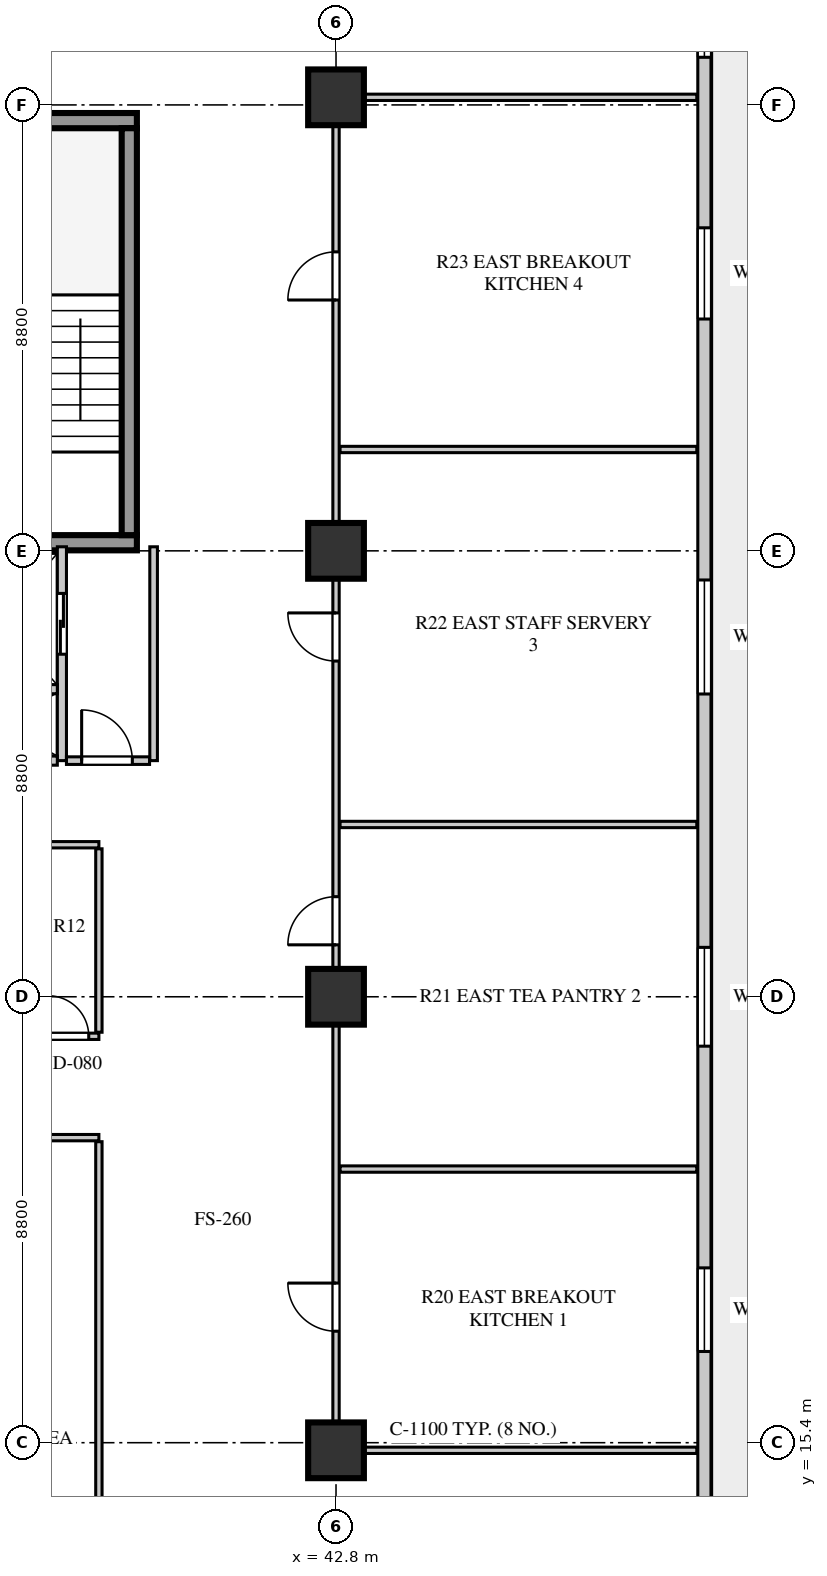
"""IFC4 building model, lengths in metres.
Left out: names, types, materials, properties, quantities, classifications, styles, units other than length and angle.
Written with IfcOpenShell. Run it as: python <this file> out.ifc"""

import sys

from ifc_helpers import new_model, si_unit, direction, frame, frame_2d, origin, origin_2d, place, context, subcontext, project, spatial, rectangle, extrude, element, fill, save


model = new_model("IFC4")
c1 = context("Model", 3, precision=1e-05, world=origin(), true_north=direction((0.0, 1.0)))
c2 = subcontext(c1, "Body", "Model", "MODEL_VIEW")
j1 = project(units=[si_unit("LENGTHUNIT", "METRE"), si_unit("PLANEANGLEUNIT", "RADIAN")], contexts=[c1])
p1 = place(None, origin())
s1 = spatial("IfcSite", under=j1, at=p1, CompositionType="ELEMENT")
p2 = place(p1, origin())
s2 = spatial("IfcBuilding", under=s1, at=p2, CompositionType="ELEMENT")
p3 = place(p2, frame((0.0, 0.0, 90.0)))
s3 = spatial("IfcBuildingStorey", under=s2, at=p3, CompositionType="ELEMENT", Elevation=90.0)
for number, where, z_axis, x_axis in (
    (1, (34.35, 33.16, 0.0), (0.0, 0.0, 1.0), (1.0, 0.0, 0.0)),
    (2, (34.35, 41.49, 0.0), (0.0, 0.0, 1.0), (1.0, 0.0, 0.0)),
):
    element("IfcWall", number, at=place(p3, frame(where, z_axis=z_axis, x_axis=x_axis)), inside=s3, PredefinedType="SHEAR", context=c2, shape_type="SweptSolid", body=[
        extrude(rectangle(XDim=4.52, YDim=0.3, at=frame_2d((2.26, 0.0))), origin(), (0.0, 0.0, 1.0), 3.7),
    ])
p4 = place(p3, frame((38.72, 33.31, 0.0), z_axis=(0.0, 0.0, 1.0), x_axis=(0.0, 1.0, 0.0)))
e3 = element("IfcWall", 3, at=p4, inside=s3, PredefinedType="SHEAR", context=c2, shape_type="SweptSolid", body=[
    extrude(rectangle(XDim=8.03, YDim=0.3, at=frame_2d((4.015, 0.0))), origin(), (0.0, 0.0, 1.0), 3.7),
])
for number, where, z_axis, x_axis in (
    (4, (42.8, 15.25, 0.0), (0.0, 0.0, 1.0), (1.0, 0.0, 0.0)),
    (5, (42.8, 24.2, 0.0), (0.0, 0.0, 1.0), (1.0, 0.0, 0.0)),
    (6, (42.8, 33.0, 0.0), (0.0, 0.0, 1.0), (1.0, 0.0, 0.0)),
    (7, (42.8, 41.95, 0.0), (0.0, 0.0, 1.0), (1.0, 0.0, 0.0)),
):
    element("IfcColumn", number, at=place(p3, frame(where, z_axis=z_axis, x_axis=x_axis)), inside=s3, PredefinedType="COLUMN", context=c2, shape_type="SweptSolid", body=[
        extrude(rectangle(XDim=1.1, YDim=1.1, at=origin_2d()), origin(), (0.0, 0.0, 1.0), 3.7),
    ])
p5 = place(p3, frame((50.07, 12.06, 0.0), z_axis=(0.0, 0.0, 1.0), x_axis=(0.0, 1.0, 0.0)))
e8 = element("IfcWall", 8, at=p5, inside=s3, PredefinedType="SOLIDWALL", context=c2, shape_type="SweptSolid", body=[
    extrude(rectangle(XDim=33.08, YDim=0.26, at=frame_2d((16.54, 0.0))), origin(), (0.0, 0.0, 1.0), 3.7),
])
p6 = place(p5, frame((0.69, 0.0, 0.0)))
e9 = element("IfcOpeningElement", 9, at=p6, cuts=e8, PredefinedType="OPENING", context=c2, shape_type="SweptSolid", body=[
    extrude(rectangle(XDim=1.0, YDim=2.05, at=frame_2d((0.5, 1.025))), frame((0.0, 0.14, 0.0), z_axis=(0.0, -1.0, 0.0), x_axis=(1.0, 0.0, 0.0)), (0.0, 0.0, 1.0), 0.28),
])
p7 = place(p5, frame((5.14, 0.0, 0.8)))
e10 = element("IfcOpeningElement", 10, at=p7, cuts=e8, PredefinedType="OPENING", context=c2, shape_type="SweptSolid", body=[
    extrude(rectangle(XDim=1.65, YDim=1.95, at=frame_2d((0.825, 0.975))), frame((0.0, 0.14, 0.0), z_axis=(0.0, -1.0, 0.0), x_axis=(1.0, 0.0, 0.0)), (0.0, 0.0, 1.0), 0.28),
])
p8 = place(p5, frame((11.165, 0.0, 0.8)))
e11 = element("IfcOpeningElement", 11, at=p8, cuts=e8, PredefinedType="OPENING", context=c2, shape_type="SweptSolid", body=[
    extrude(rectangle(XDim=1.95, YDim=2.0, at=frame_2d((0.975, 1.0))), frame((0.0, 0.14, 0.0), z_axis=(0.0, -1.0, 0.0), x_axis=(1.0, 0.0, 0.0)), (0.0, 0.0, 1.0), 0.28),
])
p9 = place(p5, frame((18.115, 0.0, 0.8)))
e12 = element("IfcOpeningElement", 12, at=p9, cuts=e8, PredefinedType="OPENING", context=c2, shape_type="SweptSolid", body=[
    extrude(rectangle(XDim=2.25, YDim=2.0, at=frame_2d((1.125, 1.0))), frame((0.0, 0.14, 0.0), z_axis=(0.0, -1.0, 0.0), x_axis=(1.0, 0.0, 0.0)), (0.0, 0.0, 1.0), 0.28),
])
p10 = place(p5, frame((25.515, 0.0, 0.8)))
e13 = element("IfcOpeningElement", 13, at=p10, cuts=e8, PredefinedType="OPENING", context=c2, shape_type="SweptSolid", body=[
    extrude(rectangle(XDim=1.8, YDim=2.0, at=frame_2d((0.9, 1.0))), frame((0.0, 0.14, 0.0), z_axis=(0.0, -1.0, 0.0), x_axis=(1.0, 0.0, 0.0)), (0.0, 0.0, 1.0), 0.28),
])
p11 = place(p5, frame((30.68, 0.0, 0.8)))
e14 = element("IfcOpeningElement", 14, at=p11, cuts=e8, PredefinedType="OPENING", context=c2, shape_type="SweptSolid", body=[
    extrude(rectangle(XDim=1.5, YDim=2.0, at=frame_2d((0.75, 1.0))), frame((0.0, 0.14, 0.0), z_axis=(0.0, -1.0, 0.0), x_axis=(1.0, 0.0, 0.0)), (0.0, 0.0, 1.0), 0.28),
])
p12 = place(p3, frame((37.39, 28.86, 0.0), z_axis=(0.0, 0.0, 1.0), x_axis=(0.0, 1.0, 0.0)))
e15 = element("IfcWall", 15, at=p12, inside=s3, PredefinedType="SOLIDWALL", context=c2, shape_type="SweptSolid", body=[
    extrude(rectangle(XDim=4.22, YDim=0.18, at=frame_2d((2.11, 0.0))), origin(), (0.0, 0.0, 1.0), 3.7),
])
p13 = place(p12, frame((2.1, 0.0, 0.0)))
e16 = element("IfcOpeningElement", 16, at=p13, cuts=e15, PredefinedType="OPENING", context=c2, shape_type="SweptSolid", body=[
    extrude(rectangle(XDim=1.2, YDim=2.12, at=frame_2d((0.6, 1.06))), frame((0.0, 0.1, 0.0), z_axis=(0.0, -1.0, 0.0), x_axis=(1.0, 0.0, 0.0)), (0.0, 0.0, 1.0), 0.2),
])
for number, where, z_axis, x_axis in (
    (17, (35.05, 28.86, 0.0), (0.0, 0.0, 1.0), (1.0, 0.0, 0.0)),
    (18, (35.05, 30.27, 0.0), (0.0, 0.0, 1.0), (1.0, 0.0, 0.0)),
):
    element("IfcWall", number, at=place(p3, frame(where, z_axis=z_axis, x_axis=x_axis)), inside=s3, PredefinedType="SOLIDWALL", context=c2, shape_type="SweptSolid", body=[
        extrude(rectangle(XDim=2.25, YDim=0.18, at=frame_2d((1.125, 0.0))), origin(), (0.0, 0.0, 1.0), 3.7),
    ])
p14 = place(p3, frame((39.2, 28.86, 0.0), z_axis=(0.0, 0.0, 1.0), x_axis=(0.0, 1.0, 0.0)))
e19 = element("IfcWall", 19, at=p14, inside=s3, PredefinedType="PARTITIONING", context=c2, shape_type="SweptSolid", body=[
    extrude(rectangle(XDim=4.22, YDim=0.15, at=frame_2d((2.11, 0.0))), origin(), (0.0, 0.0, 1.0), 3.7),
])
p15 = place(p3, frame((37.48, 28.86, 0.0), z_axis=(0.0, 0.0, 1.0), x_axis=(1.0, 0.0, 0.0)))
e20 = element("IfcWall", 20, at=p15, inside=s3, PredefinedType="PARTITIONING", context=c2, shape_type="SweptSolid", body=[
    extrude(rectangle(XDim=1.64, YDim=0.15, at=frame_2d((0.82, 0.0))), origin(), (0.0, 0.0, 1.0), 3.7),
])
p16 = place(p15, frame((0.3, 0.0, 0.0)))
e21 = element("IfcOpeningElement", 21, at=p16, cuts=e20, PredefinedType="OPENING", context=c2, shape_type="SweptSolid", body=[
    extrude(rectangle(XDim=1.0, YDim=2.1, at=frame_2d((0.5, 1.05))), frame((0.0, 0.085, 0.0), z_axis=(0.0, -1.0, 0.0), x_axis=(1.0, 0.0, 0.0)), (0.0, 0.0, 1.0), 0.17),
])
p17 = place(p3, frame((25.25, 21.42, 0.0), z_axis=(0.0, 0.0, 1.0), x_axis=(1.0, 0.0, 0.0)))
e22 = element("IfcWall", 22, at=p17, inside=s3, PredefinedType="PLUMBINGWALL", context=c2, shape_type="SweptSolid", body=[
    extrude(rectangle(XDim=12.87, YDim=0.125, at=frame_2d((6.435, 0.0))), origin(), (0.0, 0.0, 1.0), 3.3),
])
p18 = place(p17, frame((1.725, 0.0, 0.0)))
e23 = element("IfcOpeningElement", 23, at=p18, cuts=e22, PredefinedType="OPENING", context=c2, shape_type="SweptSolid", body=[
    extrude(rectangle(XDim=0.95, YDim=2.08, at=frame_2d((0.475, 1.04))), frame((0.0, 0.073, 0.0), z_axis=(0.0, -1.0, 0.0), x_axis=(1.0, 0.0, 0.0)), (0.0, 0.0, 1.0), 0.145),
])
p19 = place(p17, frame((6.175, 0.0, 0.0)))
e24 = element("IfcOpeningElement", 24, at=p19, cuts=e22, PredefinedType="OPENING", context=c2, shape_type="SweptSolid", body=[
    extrude(rectangle(XDim=0.95, YDim=2.08, at=frame_2d((0.475, 1.04))), frame((0.0, 0.073, 0.0), z_axis=(0.0, -1.0, 0.0), x_axis=(1.0, 0.0, 0.0)), (0.0, 0.0, 1.0), 0.145),
])
p20 = place(p17, frame((10.395, 0.0, 0.0)))
e25 = element("IfcOpeningElement", 25, at=p20, cuts=e22, PredefinedType="OPENING", context=c2, shape_type="SweptSolid", body=[
    extrude(rectangle(XDim=0.95, YDim=2.08, at=frame_2d((0.475, 1.04))), frame((0.0, 0.073, 0.0), z_axis=(0.0, -1.0, 0.0), x_axis=(1.0, 0.0, 0.0)), (0.0, 0.0, 1.0), 0.145),
])
p21 = place(p3, frame((38.12, 8.48, 0.0), z_axis=(0.0, 0.0, 1.0), x_axis=(0.0, 1.0, 0.0)))
e26 = element("IfcWall", 26, at=p21, inside=s3, PredefinedType="PLUMBINGWALL", context=c2, shape_type="SweptSolid", body=[
    extrude(rectangle(XDim=12.86, YDim=0.125, at=frame_2d((6.43, 0.0))), origin(), (0.0, 0.0, 1.0), 3.7),
])
p22 = place(p3, frame((34.6, 23.42, 0.0), z_axis=(0.0, 0.0, 1.0), x_axis=(1.0, 0.0, 0.0)))
e27 = element("IfcWall", 27, at=p22, inside=s3, PredefinedType="PLUMBINGWALL", context=c2, shape_type="SweptSolid", body=[
    extrude(rectangle(XDim=3.52, YDim=0.125, at=frame_2d((1.76, 0.0))), origin(), (0.0, 0.0, 1.0), 3.7),
])
p23 = place(p22, frame((0.22, 0.0, 0.0)))
e28 = element("IfcOpeningElement", 28, at=p23, cuts=e27, PredefinedType="OPENING", context=c2, shape_type="SweptSolid", body=[
    extrude(rectangle(XDim=0.8, YDim=2.05, at=frame_2d((0.4, 1.025))), frame((0.0, 0.073, 0.0), z_axis=(0.0, -1.0, 0.0), x_axis=(1.0, 0.0, 0.0)), (0.0, 0.0, 1.0), 0.145),
])
p24 = place(p22, frame((1.38, 0.0, 0.0)))
e29 = element("IfcOpeningElement", 29, at=p24, cuts=e27, PredefinedType="OPENING", context=c2, shape_type="SweptSolid", body=[
    extrude(rectangle(XDim=0.8, YDim=2.05, at=frame_2d((0.4, 1.025))), frame((0.0, 0.073, 0.0), z_axis=(0.0, -1.0, 0.0), x_axis=(1.0, 0.0, 0.0)), (0.0, 0.0, 1.0), 0.145),
])
p25 = place(p22, frame((2.52, 0.0, 0.0)))
e30 = element("IfcOpeningElement", 30, at=p25, cuts=e27, PredefinedType="OPENING", context=c2, shape_type="SweptSolid", body=[
    extrude(rectangle(XDim=0.8, YDim=2.05, at=frame_2d((0.4, 1.025))), frame((0.0, 0.073, 0.0), z_axis=(0.0, -1.0, 0.0), x_axis=(1.0, 0.0, 0.0)), (0.0, 0.0, 1.0), 0.145),
])
p26 = place(p3, frame((42.8, 15.25, 0.0), z_axis=(0.0, 0.0, 1.0), x_axis=(0.0, 1.0, 0.0)))
e31 = element("IfcWall", 31, at=p26, inside=s3, PredefinedType="PLUMBINGWALL", context=c2, shape_type="SweptSolid", body=[
    extrude(rectangle(XDim=26.7, YDim=0.125, at=frame_2d((13.35, 0.0))), origin(), (0.0, 0.0, 1.0), 3.0),
])
p27 = place(p26, frame((2.35, 0.0, 0.0)))
e32 = element("IfcOpeningElement", 32, at=p27, cuts=e31, PredefinedType="OPENING", context=c2, shape_type="SweptSolid", body=[
    extrude(rectangle(XDim=0.95, YDim=2.08, at=frame_2d((0.475, 1.04))), frame((0.0, 0.073, 0.0), z_axis=(0.0, -1.0, 0.0), x_axis=(1.0, 0.0, 0.0)), (0.0, 0.0, 1.0), 0.145),
])
p28 = place(p26, frame((9.975, 0.0, 0.0)))
e33 = element("IfcOpeningElement", 33, at=p28, cuts=e31, PredefinedType="OPENING", context=c2, shape_type="SweptSolid", body=[
    extrude(rectangle(XDim=0.95, YDim=2.08, at=frame_2d((0.475, 1.04))), frame((0.0, 0.073, 0.0), z_axis=(0.0, -1.0, 0.0), x_axis=(1.0, 0.0, 0.0)), (0.0, 0.0, 1.0), 0.145),
])
p29 = place(p26, frame((15.575, 0.0, 0.0)))
e34 = element("IfcOpeningElement", 34, at=p29, cuts=e31, PredefinedType="OPENING", context=c2, shape_type="SweptSolid", body=[
    extrude(rectangle(XDim=0.95, YDim=2.08, at=frame_2d((0.475, 1.04))), frame((0.0, 0.073, 0.0), z_axis=(0.0, -1.0, 0.0), x_axis=(1.0, 0.0, 0.0)), (0.0, 0.0, 1.0), 0.145),
])
p30 = place(p26, frame((22.7, 0.0, 0.0)))
e35 = element("IfcOpeningElement", 35, at=p30, cuts=e31, PredefinedType="OPENING", context=c2, shape_type="SweptSolid", body=[
    extrude(rectangle(XDim=0.95, YDim=2.08, at=frame_2d((0.475, 1.04))), frame((0.0, 0.073, 0.0), z_axis=(0.0, -1.0, 0.0), x_axis=(1.0, 0.0, 0.0)), (0.0, 0.0, 1.0), 0.145),
])
for number, where, z_axis, x_axis in (
    (36, (42.88, 15.25, 0.0), (0.0, 0.0, 1.0), (1.0, 0.0, 0.0)),
    (37, (42.88, 41.95, 0.0), (0.0, 0.0, 1.0), (1.0, 0.0, 0.0)),
):
    element("IfcWall", number, at=place(p3, frame(where, z_axis=z_axis, x_axis=x_axis)), inside=s3, PredefinedType="PLUMBINGWALL", context=c2, shape_type="SweptSolid", body=[
        extrude(rectangle(XDim=7.04, YDim=0.125, at=frame_2d((3.52, 0.0))), origin(), (0.0, 0.0, 1.0), 3.2),
    ])
p31 = place(p3, frame((34.6, 27.2, 0.0), z_axis=(0.0, 0.0, 1.0), x_axis=(1.0, 0.0, 0.0)))
e38 = element("IfcWall", 38, at=p31, inside=s3, PredefinedType="PLUMBINGWALL", context=c2, shape_type="SweptSolid", body=[
    extrude(rectangle(XDim=3.52, YDim=0.125, at=frame_2d((1.76, 0.0))), origin(), (0.0, 0.0, 1.0), 3.3),
])
p32 = place(p3, frame((38.12, 23.5, 0.0), z_axis=(0.0, 0.0, 1.0), x_axis=(0.0, 1.0, 0.0)))
e39 = element("IfcWall", 39, at=p32, inside=s3, PredefinedType="PLUMBINGWALL", context=c2, shape_type="SweptSolid", body=[
    extrude(rectangle(XDim=3.62, YDim=0.125, at=frame_2d((1.81, 0.0))), origin(), (0.0, 0.0, 1.0), 3.7),
])
for number, where, z_axis, x_axis in (
    (40, (42.88, 20.8, 0.0), (0.0, 0.0, 1.0), (1.0, 0.0, 0.0)),
    (41, (42.88, 27.6, 0.0), (0.0, 0.0, 1.0), (1.0, 0.0, 0.0)),
    (42, (42.88, 35.0, 0.0), (0.0, 0.0, 1.0), (1.0, 0.0, 0.0)),
):
    element("IfcWall", number, at=place(p3, frame(where, z_axis=z_axis, x_axis=x_axis)), inside=s3, PredefinedType="PLUMBINGWALL", context=c2, shape_type="SweptSolid", body=[
        extrude(rectangle(XDim=7.04, YDim=0.125, at=frame_2d((3.52, 0.0))), origin(), (0.0, 0.0, 1.0), 3.7),
    ])
p33 = place(p7, origin())
e43 = element("IfcWindow", 43, at=p33, inside=s3, PartitioningType="SINGLE_PANEL", PredefinedType="WINDOW", context=c2, shape_type="SweptSolid", body=[
    extrude(rectangle(XDim=1.65, YDim=1.95, at=frame_2d((0.825, 0.975))), frame((0.0, 0.03, 0.0), z_axis=(0.0, -1.0, 0.0), x_axis=(1.0, 0.0, 0.0)), (0.0, 0.0, 1.0), 0.06),
])
fill(e10, e43)
p34 = place(p8, origin())
e44 = element("IfcWindow", 44, at=p34, inside=s3, PartitioningType="SINGLE_PANEL", PredefinedType="WINDOW", context=c2, shape_type="SweptSolid", body=[
    extrude(rectangle(XDim=1.95, YDim=2.0, at=frame_2d((0.975, 1.0))), frame((0.0, 0.03, 0.0), z_axis=(0.0, -1.0, 0.0), x_axis=(1.0, 0.0, 0.0)), (0.0, 0.0, 1.0), 0.06),
])
fill(e11, e44)
p35 = place(p9, origin())
e45 = element("IfcWindow", 45, at=p35, inside=s3, PartitioningType="SINGLE_PANEL", PredefinedType="WINDOW", context=c2, shape_type="SweptSolid", body=[
    extrude(rectangle(XDim=2.25, YDim=2.0, at=frame_2d((1.125, 1.0))), frame((0.0, 0.03, 0.0), z_axis=(0.0, -1.0, 0.0), x_axis=(1.0, 0.0, 0.0)), (0.0, 0.0, 1.0), 0.06),
])
fill(e12, e45)
p36 = place(p10, origin())
e46 = element("IfcWindow", 46, at=p36, inside=s3, PartitioningType="SINGLE_PANEL", PredefinedType="WINDOW", context=c2, shape_type="SweptSolid", body=[
    extrude(rectangle(XDim=1.8, YDim=2.0, at=frame_2d((0.9, 1.0))), frame((0.0, 0.03, 0.0), z_axis=(0.0, -1.0, 0.0), x_axis=(1.0, 0.0, 0.0)), (0.0, 0.0, 1.0), 0.06),
])
fill(e13, e46)
p37 = place(p11, origin())
e47 = element("IfcWindow", 47, at=p37, inside=s3, PartitioningType="SINGLE_PANEL", PredefinedType="WINDOW", context=c2, shape_type="SweptSolid", body=[
    extrude(rectangle(XDim=1.5, YDim=2.0, at=frame_2d((0.75, 1.0))), frame((0.0, 0.03, 0.0), z_axis=(0.0, -1.0, 0.0), x_axis=(1.0, 0.0, 0.0)), (0.0, 0.0, 1.0), 0.06),
])
fill(e14, e47)
p38 = place(p13, frame((1.2, 0.0, 0.0), z_axis=(0.0, 0.0, 1.0), x_axis=(-1.0, 0.0, 0.0)))
e48 = element("IfcDoor", 48, at=p38, inside=s3, OperationType="DOUBLE_DOOR_SLIDING", PredefinedType="DOOR", context=c2, shape_type="SweptSolid", body=[
    extrude(rectangle(XDim=1.2, YDim=2.12, at=frame_2d((0.6, 1.06))), frame((0.0, 0.025, 0.0), z_axis=(0.0, -1.0, 0.0), x_axis=(1.0, 0.0, 0.0)), (0.0, 0.0, 1.0), 0.05),
])
fill(e16, e48)
p39 = place(p16, origin())
e49 = element("IfcDoor", 49, at=p39, inside=s3, OperationType="SINGLE_SWING_LEFT", PredefinedType="DOOR", context=c2, shape_type="SweptSolid", body=[
    extrude(rectangle(XDim=1.0, YDim=2.1, at=frame_2d((0.5, 1.05))), frame((0.0, 0.025, 0.0), z_axis=(0.0, -1.0, 0.0), x_axis=(1.0, 0.0, 0.0)), (0.0, 0.0, 1.0), 0.05),
])
fill(e21, e49)
p40 = place(p25, origin())
e50 = element("IfcDoor", 50, at=p40, inside=s3, OperationType="SINGLE_SWING_LEFT", PredefinedType="DOOR", context=c2, shape_type="SweptSolid", body=[
    extrude(rectangle(XDim=0.8, YDim=2.05, at=frame_2d((0.4, 1.025))), frame((0.0, 0.025, 0.0), z_axis=(0.0, -1.0, 0.0), x_axis=(1.0, 0.0, 0.0)), (0.0, 0.0, 1.0), 0.05),
])
fill(e30, e50)
p41 = place(p27, origin())
e51 = element("IfcDoor", 51, at=p41, inside=s3, OperationType="SINGLE_SWING_RIGHT", PredefinedType="DOOR", context=c2, shape_type="SweptSolid", body=[
    extrude(rectangle(XDim=0.95, YDim=2.08, at=frame_2d((0.475, 1.04))), frame((0.0, 0.025, 0.0), z_axis=(0.0, -1.0, 0.0), x_axis=(1.0, 0.0, 0.0)), (0.0, 0.0, 1.0), 0.05),
])
fill(e32, e51)
p42 = place(p28, origin())
e52 = element("IfcDoor", 52, at=p42, inside=s3, OperationType="SINGLE_SWING_LEFT", PredefinedType="DOOR", context=c2, shape_type="SweptSolid", body=[
    extrude(rectangle(XDim=0.95, YDim=2.08, at=frame_2d((0.475, 1.04))), frame((0.0, 0.025, 0.0), z_axis=(0.0, -1.0, 0.0), x_axis=(1.0, 0.0, 0.0)), (0.0, 0.0, 1.0), 0.05),
])
fill(e33, e52)
p43 = place(p29, origin())
e53 = element("IfcDoor", 53, at=p43, inside=s3, OperationType="SINGLE_SWING_RIGHT", PredefinedType="DOOR", context=c2, shape_type="SweptSolid", body=[
    extrude(rectangle(XDim=0.95, YDim=2.08, at=frame_2d((0.475, 1.04))), frame((0.0, 0.025, 0.0), z_axis=(0.0, -1.0, 0.0), x_axis=(1.0, 0.0, 0.0)), (0.0, 0.0, 1.0), 0.05),
])
fill(e34, e53)
p44 = place(p30, origin())
e54 = element("IfcDoor", 54, at=p44, inside=s3, OperationType="SINGLE_SWING_LEFT", PredefinedType="DOOR", context=c2, shape_type="SweptSolid", body=[
    extrude(rectangle(XDim=0.95, YDim=2.08, at=frame_2d((0.475, 1.04))), frame((0.0, 0.025, 0.0), z_axis=(0.0, -1.0, 0.0), x_axis=(1.0, 0.0, 0.0)), (0.0, 0.0, 1.0), 0.05),
])
fill(e35, e54)
save(model, sys.argv[1])
